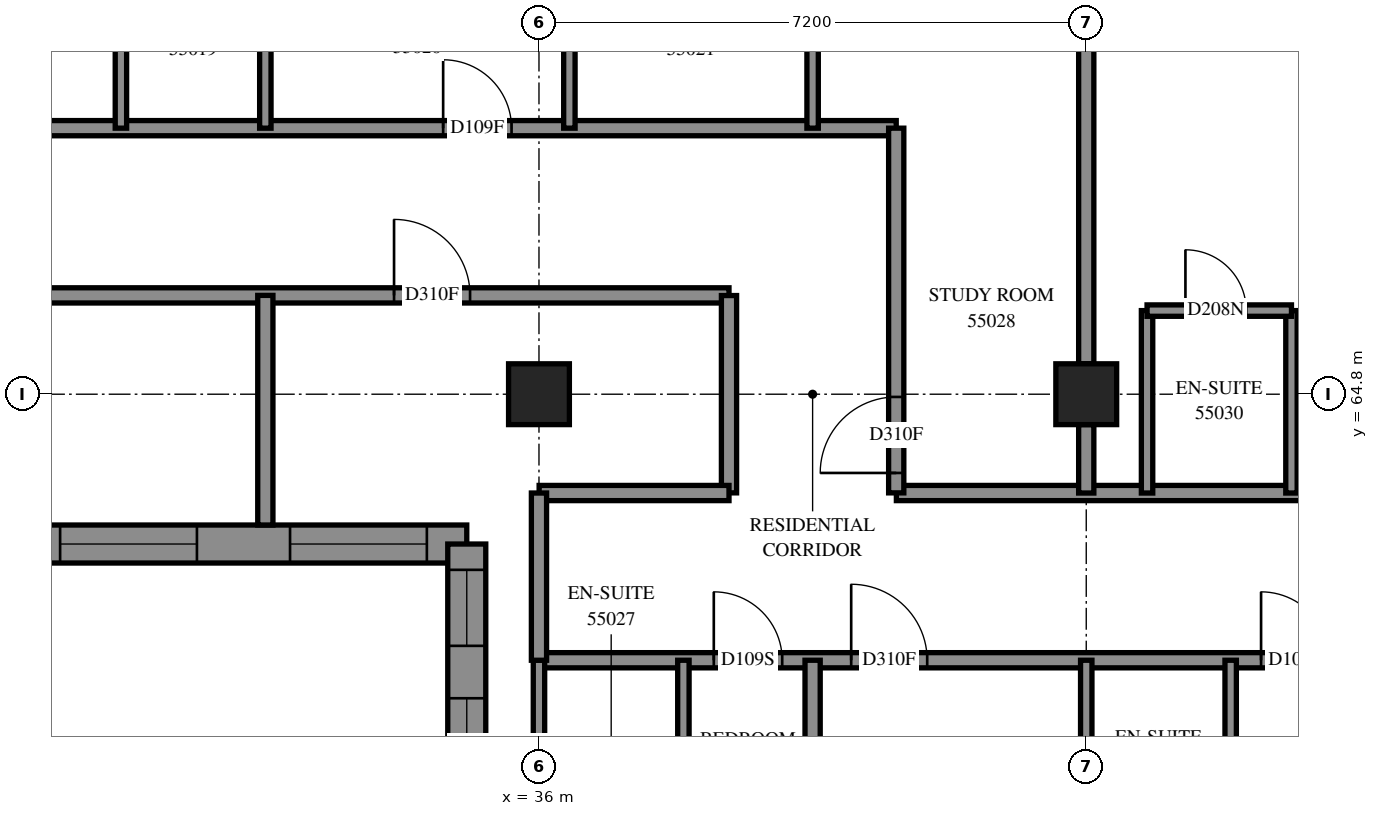
"""IFC4 building model, lengths in metres.
Left out: names, types, materials, properties, quantities, classifications, styles, units other than length and angle.
Written with IfcOpenShell. Run it as: python <this file> out.ifc"""

import sys

from ifc_helpers import new_model, si_unit, direction, frame, frame_2d, origin, origin_2d, place, context, subcontext, project, spatial, polyline, rectangle, outline, extrude, element, fill, save


model = new_model("IFC4")
c1 = context("Model", 3, precision=1e-05, world=origin(), true_north=direction((0.0, 1.0)))
c2 = subcontext(c1, "Body", "Model", "MODEL_VIEW")
j1 = project(units=[si_unit("LENGTHUNIT", "METRE"), si_unit("PLANEANGLEUNIT", "RADIAN")], contexts=[c1])
p1 = place(None, origin())
s1 = spatial("IfcSite", under=j1, at=p1, CompositionType="ELEMENT")
p2 = place(p1, origin())
s2 = spatial("IfcBuilding", under=s1, at=p2, CompositionType="ELEMENT")
p3 = place(p2, frame((0.0, 0.0, 203.2)))
s3 = spatial("IfcBuildingStorey", under=s2, at=p3, CompositionType="ELEMENT", Elevation=203.2)
for number, where, z_axis, x_axis in (
    (1, (36.0, 64.8, 0.0), (0.0, 0.0, 1.0), (1.0, 0.0, 0.0)),
    (2, (43.2, 64.8, 0.0), (0.0, 0.0, 1.0), (1.0, 0.0, 0.0)),
):
    element("IfcColumn", number, at=place(p3, frame(where, z_axis=z_axis, x_axis=x_axis)), inside=s3, PredefinedType="COLUMN", context=c2, shape_type="SweptSolid", body=[
        extrude(rectangle(XDim=0.8, YDim=0.8, at=origin_2d()), origin(), (0.0, 0.0, 1.0), 3.1),
    ])
p4 = place(p3, frame((19.629, 62.829, 0.0), z_axis=(0.0, 0.0, 1.0), x_axis=(1.0, 0.0, 0.0)))
e3 = element("IfcWall", 3, at=p4, inside=s3, PredefinedType="SOLIDWALL", context=c2, shape_type="SweptSolid", body=[
    extrude(outline(polyline([(-0.25, -0.25), (15.171, -0.25), (15.671, 0.25), (0.25, 0.25), (-0.25, -0.25)])), origin(), (0.0, 0.0, 1.0), 3.1),
])
p5 = place(p4, frame((2.671, 0.0, 0.7)))
e4 = element("IfcOpeningElement", 4, at=p5, cuts=e3, PredefinedType="OPENING", context=c2, shape_type="SweptSolid", body=[
    extrude(rectangle(XDim=1.8, YDim=1.8, at=frame_2d((0.9, 0.9))), frame((0.0, 0.26, 0.0), z_axis=(0.0, -1.0, 0.0), x_axis=(1.0, 0.0, 0.0)), (0.0, 0.0, 1.0), 0.52),
])
p6 = place(p4, frame((6.471, 0.0, 0.7)))
e5 = element("IfcOpeningElement", 5, at=p6, cuts=e3, PredefinedType="OPENING", context=c2, shape_type="SweptSolid", body=[
    extrude(rectangle(XDim=1.8, YDim=1.8, at=frame_2d((0.9, 0.9))), frame((0.0, 0.26, 0.0), z_axis=(0.0, -1.0, 0.0), x_axis=(1.0, 0.0, 0.0)), (0.0, 0.0, 1.0), 0.52),
])
p7 = place(p4, frame((10.071, 0.0, 0.7)))
e6 = element("IfcOpeningElement", 6, at=p7, cuts=e3, PredefinedType="OPENING", context=c2, shape_type="SweptSolid", body=[
    extrude(rectangle(XDim=1.8, YDim=1.8, at=frame_2d((0.9, 0.9))), frame((0.0, 0.26, 0.0), z_axis=(0.0, -1.0, 0.0), x_axis=(1.0, 0.0, 0.0)), (0.0, 0.0, 1.0), 0.52),
])
p8 = place(p4, frame((13.096, 0.0, 0.7)))
e7 = element("IfcOpeningElement", 7, at=p8, cuts=e3, PredefinedType="OPENING", context=c2, shape_type="SweptSolid", body=[
    extrude(rectangle(XDim=1.8, YDim=1.8, at=frame_2d((0.9, 0.9))), frame((0.0, 0.26, 0.0), z_axis=(0.0, -1.0, 0.0), x_axis=(1.0, 0.0, 0.0)), (0.0, 0.0, 1.0), 0.52),
])
p9 = place(p3, frame((35.05, 62.829, 0.0), z_axis=(0.0, 0.0, 1.0), x_axis=(0.0, -1.0, 0.0)))
e8 = element("IfcWall", 8, at=p9, inside=s3, PredefinedType="SOLIDWALL", context=c2, shape_type="SweptSolid", body=[
    extrude(outline(polyline([(0.25, -0.25), (6.429, -0.25), (5.929, 0.25), (-0.25, 0.25), (0.25, -0.25)])), origin(), (0.0, 0.0, 1.0), 3.1),
])
p10 = place(p9, frame((2.029, 0.0, 0.45)))
e9 = element("IfcOpeningElement", 9, at=p10, cuts=e8, PredefinedType="OPENING", context=c2, shape_type="SweptSolid", body=[
    extrude(rectangle(XDim=1.3, YDim=2.5, at=frame_2d((0.65, 1.25))), frame((0.0, 0.26, 0.0), z_axis=(0.0, -1.0, 0.0), x_axis=(1.0, 0.0, 0.0)), (0.0, 0.0, 1.0), 0.52),
])
p11 = place(p9, frame((4.079, 0.0, 0.45)))
e10 = element("IfcOpeningElement", 10, at=p11, cuts=e8, PredefinedType="OPENING", context=c2, shape_type="SweptSolid", body=[
    extrude(rectangle(XDim=1.3, YDim=2.5, at=frame_2d((0.65, 1.25))), frame((0.0, 0.26, 0.0), z_axis=(0.0, -1.0, 0.0), x_axis=(1.0, 0.0, 0.0)), (0.0, 0.0, 1.0), 0.52),
])
p12 = place(p9, frame((0.34, 0.0, 0.45)))
e11 = element("IfcOpeningElement", 11, at=p12, cuts=e8, PredefinedType="OPENING", context=c2, shape_type="SweptSolid", body=[
    extrude(rectangle(XDim=1.0, YDim=2.5, at=frame_2d((0.5, 1.25))), frame((0.0, 0.26, 0.0), z_axis=(0.0, -1.0, 0.0), x_axis=(1.0, 0.0, 0.0)), (0.0, 0.0, 1.0), 0.52),
])
p13 = place(p3, frame((21.6, 68.3, 0.0), z_axis=(0.0, 0.0, 1.0), x_axis=(1.0, 0.0, 0.0)))
e12 = element("IfcWall", 12, at=p13, inside=s3, PredefinedType="PARTITIONING", context=c2, shape_type="SweptSolid", body=[
    extrude(rectangle(XDim=19.1, YDim=0.2, at=frame_2d((9.55, 0.0))), origin(), (0.0, 0.0, 1.0), 3.1),
])
p14 = place(p13, frame((2.3, 0.0, 0.0)))
e13 = element("IfcOpeningElement", 13, at=p14, cuts=e12, PredefinedType="OPENING", context=c2, shape_type="SweptSolid", body=[
    extrude(rectangle(XDim=0.9, YDim=2.1, at=frame_2d((0.45, 1.05))), frame((0.0, 0.11, 0.0), z_axis=(0.0, -1.0, 0.0), x_axis=(1.0, 0.0, 0.0)), (0.0, 0.0, 1.0), 0.22),
])
p15 = place(p13, frame((5.901, 0.0, 0.0)))
e14 = element("IfcOpeningElement", 14, at=p15, cuts=e12, PredefinedType="OPENING", context=c2, shape_type="SweptSolid", body=[
    extrude(rectangle(XDim=0.9, YDim=2.1, at=frame_2d((0.45, 1.05))), frame((0.0, 0.11, 0.0), z_axis=(0.0, -1.0, 0.0), x_axis=(1.0, 0.0, 0.0)), (0.0, 0.0, 1.0), 0.22),
])
p16 = place(p13, frame((13.139, 0.0, 0.0)))
e15 = element("IfcOpeningElement", 15, at=p16, cuts=e12, PredefinedType="OPENING", context=c2, shape_type="SweptSolid", body=[
    extrude(rectangle(XDim=0.9, YDim=2.1, at=frame_2d((0.45, 1.05))), frame((0.0, 0.11, 0.0), z_axis=(0.0, -1.0, 0.0), x_axis=(1.0, 0.0, 0.0)), (0.0, 0.0, 1.0), 0.22),
])
p17 = place(p3, frame((21.6, 66.1, 0.0), z_axis=(0.0, 0.0, 1.0), x_axis=(1.0, 0.0, 0.0)))
e16 = element("IfcWall", 16, at=p17, inside=s3, PredefinedType="PARTITIONING", context=c2, shape_type="SweptSolid", body=[
    extrude(rectangle(XDim=16.9, YDim=0.2, at=frame_2d((8.45, 0.0))), origin(), (0.0, 0.0, 1.0), 3.1),
])
p18 = place(p17, frame((12.493, 0.0, 0.0)))
e17 = element("IfcOpeningElement", 17, at=p18, cuts=e16, PredefinedType="OPENING", context=c2, shape_type="SweptSolid", body=[
    extrude(rectangle(XDim=1.0, YDim=2.1, at=frame_2d((0.5, 1.05))), frame((0.0, 0.11, 0.0), z_axis=(0.0, -1.0, 0.0), x_axis=(1.0, 0.0, 0.0)), (0.0, 0.0, 1.0), 0.22),
])
p19 = place(p3, frame((36.0, 61.3, 0.0), z_axis=(0.0, 0.0, 1.0), x_axis=(1.0, 0.0, 0.0)))
e18 = element("IfcWall", 18, at=p19, inside=s3, PredefinedType="PARTITIONING", context=c2, shape_type="SweptSolid", body=[
    extrude(rectangle(XDim=16.9, YDim=0.2, at=frame_2d((8.45, 0.0))), origin(), (0.0, 0.0, 1.0), 3.1),
])
p20 = place(p19, frame((2.3, 0.0, 0.0)))
e19 = element("IfcOpeningElement", 19, at=p20, cuts=e18, PredefinedType="OPENING", context=c2, shape_type="SweptSolid", body=[
    extrude(rectangle(XDim=0.9, YDim=2.1, at=frame_2d((0.45, 1.05))), frame((0.0, 0.11, 0.0), z_axis=(0.0, -1.0, 0.0), x_axis=(1.0, 0.0, 0.0)), (0.0, 0.0, 1.0), 0.22),
])
p21 = place(p19, frame((4.107, 0.0, 0.0)))
e20 = element("IfcOpeningElement", 20, at=p21, cuts=e18, PredefinedType="OPENING", context=c2, shape_type="SweptSolid", body=[
    extrude(rectangle(XDim=1.0, YDim=2.1, at=frame_2d((0.5, 1.05))), frame((0.0, 0.11, 0.0), z_axis=(0.0, -1.0, 0.0), x_axis=(1.0, 0.0, 0.0)), (0.0, 0.0, 1.0), 0.22),
])
p22 = place(p19, frame((9.5, 0.0, 0.0)))
e21 = element("IfcOpeningElement", 21, at=p22, cuts=e18, PredefinedType="OPENING", context=c2, shape_type="SweptSolid", body=[
    extrude(rectangle(XDim=0.9, YDim=2.1, at=frame_2d((0.45, 1.05))), frame((0.0, 0.11, 0.0), z_axis=(0.0, -1.0, 0.0), x_axis=(1.0, 0.0, 0.0)), (0.0, 0.0, 1.0), 0.22),
])
p23 = place(p19, frame((11.307, 0.0, 0.0)))
e22 = element("IfcOpeningElement", 22, at=p23, cuts=e18, PredefinedType="OPENING", context=c2, shape_type="SweptSolid", body=[
    extrude(rectangle(XDim=1.0, YDim=2.1, at=frame_2d((0.5, 1.05))), frame((0.0, 0.11, 0.0), z_axis=(0.0, -1.0, 0.0), x_axis=(1.0, 0.0, 0.0)), (0.0, 0.0, 1.0), 0.22),
])
p24 = place(p19, frame((15.647, 0.0, 0.0)))
e23 = element("IfcOpeningElement", 23, at=p24, cuts=e18, PredefinedType="OPENING", context=c2, shape_type="SweptSolid", body=[
    extrude(rectangle(XDim=1.0, YDim=2.1, at=frame_2d((0.5, 1.05))), frame((0.0, 0.11, 0.0), z_axis=(0.0, -1.0, 0.0), x_axis=(1.0, 0.0, 0.0)), (0.0, 0.0, 1.0), 0.22),
])
p25 = place(p3, frame((40.702, 63.5, 0.0), z_axis=(0.0, 0.0, 1.0), x_axis=(1.0, 0.0, 0.0)))
e24 = element("IfcWall", 24, at=p25, inside=s3, PredefinedType="PARTITIONING", context=c2, shape_type="SweptSolid", body=[
    extrude(rectangle(XDim=14.298, YDim=0.2, at=frame_2d((7.149, 0.0))), origin(), (0.0, 0.0, 1.0), 3.1),
])
p26 = place(p25, frame((6.332, 0.0, 0.0)))
e25 = element("IfcOpeningElement", 25, at=p26, cuts=e24, PredefinedType="OPENING", context=c2, shape_type="SweptSolid", body=[
    extrude(rectangle(XDim=0.9, YDim=2.1, at=frame_2d((0.45, 1.05))), frame((0.0, 0.11, 0.0), z_axis=(0.0, -1.0, 0.0), x_axis=(1.0, 0.0, 0.0)), (0.0, 0.0, 1.0), 0.22),
])
p27 = place(p25, frame((10.098, 0.0, 0.0)))
e26 = element("IfcOpeningElement", 26, at=p27, cuts=e24, PredefinedType="OPENING", context=c2, shape_type="SweptSolid", body=[
    extrude(rectangle(XDim=0.9, YDim=2.1, at=frame_2d((0.45, 1.05))), frame((0.0, 0.11, 0.0), z_axis=(0.0, -1.0, 0.0), x_axis=(1.0, 0.0, 0.0)), (0.0, 0.0, 1.0), 0.22),
])
p28 = place(p3, frame((43.2, 65.2, 0.0), z_axis=(0.0, 0.0, 1.0), x_axis=(0.0, 1.0, 0.0)))
e27 = element("IfcWall", 27, at=p28, inside=s3, PredefinedType="PARTITIONING", context=c2, shape_type="SweptSolid", body=[
    extrude(rectangle(XDim=6.4, YDim=0.2, at=frame_2d((3.2, 0.0))), origin(), (0.0, 0.0, 1.0), 3.1),
])
p29 = place(p3, frame((40.7, 63.502, 0.0), z_axis=(0.0, 0.0, 1.0), x_axis=(0.0, 1.0, 0.0)))
e28 = element("IfcWall", 28, at=p29, inside=s3, PredefinedType="PARTITIONING", context=c2, shape_type="SweptSolid", body=[
    extrude(rectangle(XDim=4.798, YDim=0.2, at=frame_2d((2.399, 0.0))), origin(), (0.0, 0.0, 1.0), 3.1),
])
p30 = place(p29, frame((0.262, 0.0, 0.0)))
e29 = element("IfcOpeningElement", 29, at=p30, cuts=e28, PredefinedType="OPENING", context=c2, shape_type="SweptSolid", body=[
    extrude(rectangle(XDim=1.0, YDim=2.1, at=frame_2d((0.5, 1.05))), frame((0.0, 0.11, 0.0), z_axis=(0.0, -1.0, 0.0), x_axis=(1.0, 0.0, 0.0)), (0.0, 0.0, 1.0), 0.22),
])
p31 = place(p3, frame((39.6, 56.9, 0.0), z_axis=(0.0, 0.0, 1.0), x_axis=(0.0, 1.0, 0.0)))
e30 = element("IfcWall", 30, at=p31, inside=s3, PredefinedType="PARTITIONING", context=c2, shape_type="SweptSolid", body=[
    extrude(rectangle(XDim=4.4, YDim=0.2, at=frame_2d((2.2, 0.0))), origin(), (0.0, 0.0, 1.0), 3.1),
])
p32 = place(p3, frame((32.4, 63.079, 0.0), z_axis=(0.0, 0.0, 1.0), x_axis=(0.0, 1.0, 0.0)))
e31 = element("IfcWall", 31, at=p32, inside=s3, PredefinedType="PARTITIONING", context=c2, shape_type="SweptSolid", body=[
    extrude(rectangle(XDim=3.021, YDim=0.2, at=frame_2d((1.51, 0.0))), origin(), (0.0, 0.0, 1.0), 3.1),
])
p33 = place(p3, frame((38.5, 63.502, 0.0), z_axis=(0.0, 0.0, 1.0), x_axis=(0.0, 1.0, 0.0)))
e32 = element("IfcWall", 32, at=p33, inside=s3, PredefinedType="PARTITIONING", context=c2, shape_type="SweptSolid", body=[
    extrude(rectangle(XDim=2.596, YDim=0.2, at=frame_2d((1.298, 0.0))), origin(), (0.0, 0.0, 1.0), 3.1),
])
p34 = place(p3, frame((36.002, 63.5, 0.0), z_axis=(0.0, 0.0, 1.0), x_axis=(1.0, 0.0, 0.0)))
e33 = element("IfcWall", 33, at=p34, inside=s3, PredefinedType="PARTITIONING", context=c2, shape_type="SweptSolid", body=[
    extrude(rectangle(XDim=2.498, YDim=0.2, at=frame_2d((1.249, 0.0))), origin(), (0.0, 0.0, 1.0), 3.1),
])
for number, where, z_axis, x_axis in (
    (34, (30.5, 68.3, 0.0), (0.0, 0.0, 1.0), (0.0, 1.0, 0.0)),
    (35, (32.4, 68.3, 0.0), (0.0, 0.0, 1.0), (0.0, 1.0, 0.0)),
    (36, (36.4, 68.3, 0.0), (0.0, 0.0, 1.0), (0.0, 1.0, 0.0)),
    (37, (39.6, 68.3, 0.0), (0.0, 0.0, 1.0), (0.0, 1.0, 0.0)),
    (38, (44.0, 63.5, 0.0), (0.0, 0.0, 1.0), (0.0, 1.0, 0.0)),
    (39, (45.9, 63.5, 0.0), (0.0, 0.0, 1.0), (0.0, 1.0, 0.0)),
    (40, (37.9, 58.9, 0.0), (0.0, 0.0, 1.0), (0.0, 1.0, 0.0)),
):
    element("IfcWall", number, at=place(p3, frame(where, z_axis=z_axis, x_axis=x_axis)), inside=s3, PredefinedType="PARTITIONING", context=c2, shape_type="SweptSolid", body=[
        extrude(rectangle(XDim=2.4, YDim=0.15, at=frame_2d((1.2, 0.0))), origin(), (0.0, 0.0, 1.0), 3.1),
    ])
p35 = place(p3, frame((36.0, 58.9, 0.0), z_axis=(0.0, 0.0, 1.0), x_axis=(0.0, 1.0, 0.0)))
e41 = element("IfcWall", 41, at=p35, inside=s3, PredefinedType="PARTITIONING", context=c2, shape_type="SweptSolid", body=[
    extrude(rectangle(XDim=2.4, YDim=0.15, at=frame_2d((1.2, 0.0))), origin(), (0.0, 0.0, 1.0), 2.6),
])
for number, where, z_axis, x_axis in (
    (42, (45.1, 58.9, 0.0), (0.0, 0.0, 1.0), (0.0, 1.0, 0.0)),
    (43, (43.2, 58.9, 0.0), (0.0, 0.0, 1.0), (0.0, 1.0, 0.0)),
):
    element("IfcWall", number, at=place(p3, frame(where, z_axis=z_axis, x_axis=x_axis)), inside=s3, PredefinedType="PARTITIONING", context=c2, shape_type="SweptSolid", body=[
        extrude(rectangle(XDim=2.4, YDim=0.15, at=frame_2d((1.2, 0.0))), origin(), (0.0, 0.0, 1.0), 3.1),
    ])
p36 = place(p3, frame((36.0, 61.3, 0.0), z_axis=(0.0, 0.0, 1.0), x_axis=(0.0, 1.0, 0.0)))
e44 = element("IfcWall", 44, at=p36, inside=s3, PredefinedType="PARTITIONING", context=c2, shape_type="SweptSolid", body=[
    extrude(rectangle(XDim=2.2, YDim=0.2, at=frame_2d((1.1, 0.0))), origin(), (0.0, 0.0, 1.0), 2.6),
])
p37 = place(p3, frame((44.0, 65.9, 0.0), z_axis=(0.0, 0.0, 1.0), x_axis=(1.0, 0.0, 0.0)))
e45 = element("IfcWall", 45, at=p37, inside=s3, PredefinedType="PARTITIONING", context=c2, shape_type="SweptSolid", body=[
    extrude(rectangle(XDim=1.9, YDim=0.15, at=frame_2d((0.95, 0.0))), origin(), (0.0, 0.0, 1.0), 3.1),
])
p38 = place(p37, frame((0.505, 0.0, 0.0)))
e46 = element("IfcOpeningElement", 46, at=p38, cuts=e45, PredefinedType="OPENING", context=c2, shape_type="SweptSolid", body=[
    extrude(rectangle(XDim=0.8, YDim=2.1, at=frame_2d((0.4, 1.05))), frame((0.0, 0.085, 0.0), z_axis=(0.0, -1.0, 0.0), x_axis=(1.0, 0.0, 0.0)), (0.0, 0.0, 1.0), 0.17),
])
p39 = place(p3, frame((43.2, 63.5, 0.0), z_axis=(0.0, 0.0, 1.0), x_axis=(0.0, 1.0, 0.0)))
e47 = element("IfcWall", 47, at=p39, inside=s3, PredefinedType="PARTITIONING", context=c2, shape_type="SweptSolid", body=[
    extrude(rectangle(XDim=0.9, YDim=0.2, at=frame_2d((0.45, 0.0))), origin(), (0.0, 0.0, 1.0), 3.1),
])
p40 = place(p7, origin())
e48 = element("IfcWindow", 48, at=p40, inside=s3, PartitioningType="SINGLE_PANEL", PredefinedType="WINDOW", context=c2, shape_type="SweptSolid", body=[
    extrude(rectangle(XDim=1.8, YDim=1.8, at=frame_2d((0.9, 0.9))), frame((0.0, 0.18, 0.0), z_axis=(0.0, -1.0, 0.0), x_axis=(1.0, 0.0, 0.0)), (0.0, 0.0, 1.0), 0.06),
])
fill(e6, e48)
p41 = place(p8, origin())
e49 = element("IfcWindow", 49, at=p41, inside=s3, PartitioningType="SINGLE_PANEL", PredefinedType="WINDOW", context=c2, shape_type="SweptSolid", body=[
    extrude(rectangle(XDim=1.8, YDim=1.8, at=frame_2d((0.9, 0.9))), frame((0.0, 0.18, 0.0), z_axis=(0.0, -1.0, 0.0), x_axis=(1.0, 0.0, 0.0)), (0.0, 0.0, 1.0), 0.06),
])
fill(e7, e49)
p42 = place(p10, origin())
e50 = element("IfcWindow", 50, at=p42, inside=s3, PartitioningType="SINGLE_PANEL", PredefinedType="WINDOW", context=c2, shape_type="SweptSolid", body=[
    extrude(rectangle(XDim=1.3, YDim=2.5, at=frame_2d((0.65, 1.25))), frame((0.0, 0.18, 0.0), z_axis=(0.0, -1.0, 0.0), x_axis=(1.0, 0.0, 0.0)), (0.0, 0.0, 1.0), 0.06),
])
fill(e9, e50)
p43 = place(p16, origin())
e51 = element("IfcDoor", 51, at=p43, inside=s3, OperationType="SINGLE_SWING_LEFT", PredefinedType="DOOR", context=c2, shape_type="SweptSolid", body=[
    extrude(rectangle(XDim=0.9, YDim=2.1, at=frame_2d((0.45, 1.05))), frame((0.0, 0.025, 0.0), z_axis=(0.0, -1.0, 0.0), x_axis=(1.0, 0.0, 0.0)), (0.0, 0.0, 1.0), 0.05),
])
fill(e15, e51)
p44 = place(p18, origin())
e52 = element("IfcDoor", 52, at=p44, inside=s3, OperationType="SINGLE_SWING_RIGHT", PredefinedType="DOOR", context=c2, shape_type="SweptSolid", body=[
    extrude(rectangle(XDim=1.0, YDim=2.1, at=frame_2d((0.5, 1.05))), frame((0.0, 0.025, 0.0), z_axis=(0.0, -1.0, 0.0), x_axis=(1.0, 0.0, 0.0)), (0.0, 0.0, 1.0), 0.05),
])
fill(e17, e52)
p45 = place(p20, origin())
e53 = element("IfcDoor", 53, at=p45, inside=s3, OperationType="SINGLE_SWING_LEFT", PredefinedType="DOOR", context=c2, shape_type="SweptSolid", body=[
    extrude(rectangle(XDim=0.9, YDim=2.1, at=frame_2d((0.45, 1.05))), frame((0.0, 0.025, 0.0), z_axis=(0.0, -1.0, 0.0), x_axis=(1.0, 0.0, 0.0)), (0.0, 0.0, 1.0), 0.05),
])
fill(e19, e53)
p46 = place(p30, origin())
e54 = element("IfcDoor", 54, at=p46, inside=s3, OperationType="SINGLE_SWING_LEFT", PredefinedType="DOOR", context=c2, shape_type="SweptSolid", body=[
    extrude(rectangle(XDim=1.0, YDim=2.1, at=frame_2d((0.5, 1.05))), frame((0.0, 0.025, 0.0), z_axis=(0.0, -1.0, 0.0), x_axis=(1.0, 0.0, 0.0)), (0.0, 0.0, 1.0), 0.05),
])
fill(e29, e54)
p47 = place(p38, origin())
e55 = element("IfcDoor", 55, at=p47, inside=s3, OperationType="SINGLE_SWING_RIGHT", PredefinedType="DOOR", context=c2, shape_type="SweptSolid", body=[
    extrude(rectangle(XDim=0.8, YDim=2.1, at=frame_2d((0.4, 1.05))), frame((0.0, 0.025, 0.0), z_axis=(0.0, -1.0, 0.0), x_axis=(1.0, 0.0, 0.0)), (0.0, 0.0, 1.0), 0.05),
])
fill(e46, e55)
p48 = place(p21, origin())
e56 = element("IfcDoor", 56, at=p48, inside=s3, OperationType="SINGLE_SWING_RIGHT", PredefinedType="DOOR", context=c2, shape_type="SweptSolid", body=[
    extrude(rectangle(XDim=1.0, YDim=2.1, at=frame_2d((0.5, 1.05))), frame((0.0, 0.025, 0.0), z_axis=(0.0, -1.0, 0.0), x_axis=(1.0, 0.0, 0.0)), (0.0, 0.0, 1.0), 0.05),
])
fill(e20, e56)
p49 = place(p22, origin())
e57 = element("IfcDoor", 57, at=p49, inside=s3, OperationType="SINGLE_SWING_LEFT", PredefinedType="DOOR", context=c2, shape_type="SweptSolid", body=[
    extrude(rectangle(XDim=0.9, YDim=2.1, at=frame_2d((0.45, 1.05))), frame((0.0, 0.025, 0.0), z_axis=(0.0, -1.0, 0.0), x_axis=(1.0, 0.0, 0.0)), (0.0, 0.0, 1.0), 0.05),
])
fill(e21, e57)
p50 = place(p12, origin())
e58 = element("IfcWindow", 58, at=p50, inside=s3, PartitioningType="SINGLE_PANEL", PredefinedType="WINDOW", context=c2, shape_type="SweptSolid", body=[
    extrude(rectangle(XDim=1.0, YDim=2.5, at=frame_2d((0.5, 1.25))), frame((0.0, 0.18, 0.0), z_axis=(0.0, -1.0, 0.0), x_axis=(1.0, 0.0, 0.0)), (0.0, 0.0, 1.0), 0.06),
])
fill(e11, e58)
save(model, sys.argv[1])
